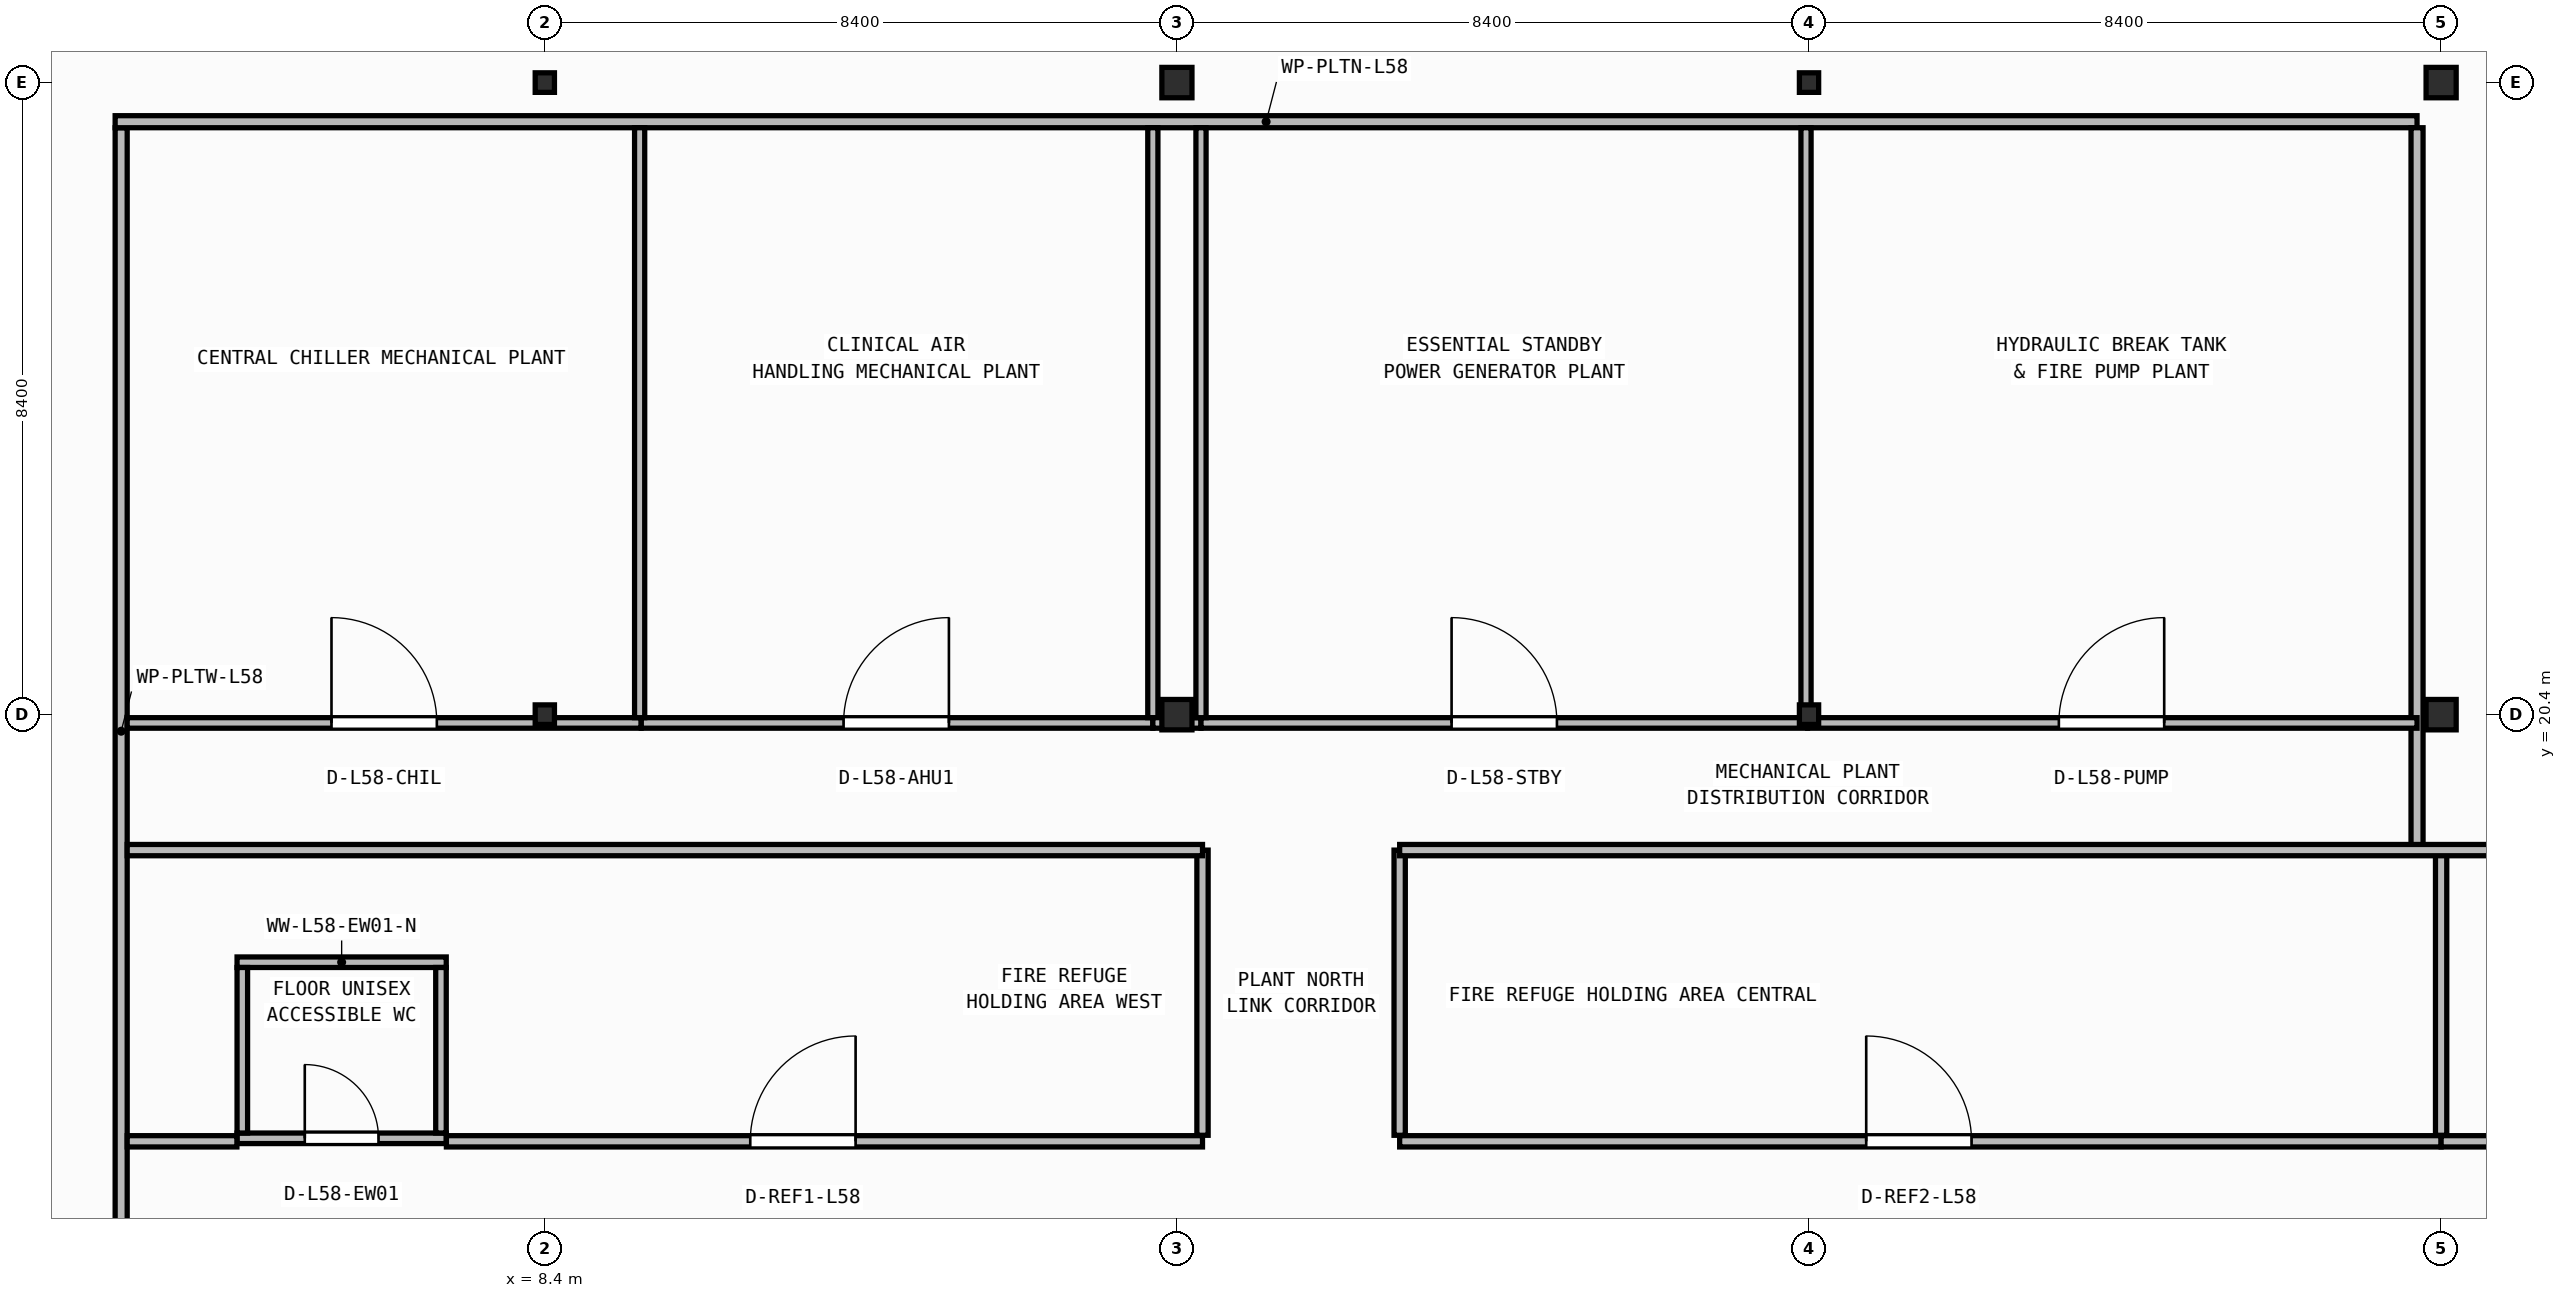
"""IFC4 building model, lengths in metres.
Left out: names, types, materials, properties, quantities, classifications, styles, units other than length and angle.
Written with IfcOpenShell. Run it as: python <this file> out.ifc"""

import sys

from ifc_helpers import new_model, si_unit, direction, frame, frame_2d, origin, origin_2d, place, context, subcontext, project, spatial, rectangle, i_section, extrude, element, fill, save


model = new_model("IFC4")
c1 = context("Model", 3, precision=1e-05, world=origin(), true_north=direction((0.0, 1.0)))
c2 = subcontext(c1, "Body", "Model", "MODEL_VIEW")
j1 = project(units=[si_unit("LENGTHUNIT", "METRE"), si_unit("PLANEANGLEUNIT", "RADIAN")], contexts=[c1])
p1 = place(None, origin())
s1 = spatial("IfcSite", under=j1, at=p1, CompositionType="ELEMENT")
p2 = place(p1, origin())
s2 = spatial("IfcBuilding", under=s1, at=p2, CompositionType="ELEMENT")
p3 = place(p2, frame((0.0, 0.0, 235.55)))
s3 = spatial("IfcBuildingStorey", under=s2, at=p3, CompositionType="ELEMENT", Elevation=235.55)
p4 = place(p3, frame((8.4, 20.4, 0.0), z_axis=(0.0, 0.0, 1.0), x_axis=(1.0, 0.0, 0.0)))
e1 = element("IfcColumn", 1, at=p4, inside=s3, PredefinedType="COLUMN", context=c2, shape_type="SweptSolid", body=[
    extrude(i_section(OverallWidth=0.256, OverallDepth=0.26, WebThickness=0.01, FlangeThickness=0.017, FilletRadius=0.013, at=origin_2d()), origin(), (0.0, 0.0, 1.0), 5.2),
])
p5 = place(p3, frame((16.8, 20.4, 0.0), z_axis=(0.0, 0.0, 1.0), x_axis=(1.0, 0.0, 0.0)))
e2 = element("IfcColumn", 2, at=p5, inside=s3, PredefinedType="COLUMN", context=c2, shape_type="SweptSolid", body=[
    extrude(i_section(OverallWidth=0.4, OverallDepth=0.404, WebThickness=0.02, FlangeThickness=0.032, at=origin_2d()), origin(), (0.0, 0.0, 1.0), 5.2),
])
p6 = place(p3, frame((25.2, 20.4, 0.0), z_axis=(0.0, 0.0, 1.0), x_axis=(1.0, 0.0, 0.0)))
e3 = element("IfcColumn", 3, at=p6, inside=s3, PredefinedType="COLUMN", context=c2, shape_type="SweptSolid", body=[
    extrude(i_section(OverallWidth=0.256, OverallDepth=0.26, WebThickness=0.01, FlangeThickness=0.017, FilletRadius=0.013, at=origin_2d()), origin(), (0.0, 0.0, 1.0), 5.2),
])
p7 = place(p3, frame((33.6, 20.4, 0.0), z_axis=(0.0, 0.0, 1.0), x_axis=(1.0, 0.0, 0.0)))
e4 = element("IfcColumn", 4, at=p7, inside=s3, PredefinedType="COLUMN", context=c2, shape_type="SweptSolid", body=[
    extrude(i_section(OverallWidth=0.4, OverallDepth=0.404, WebThickness=0.02, FlangeThickness=0.032, at=origin_2d()), origin(), (0.0, 0.0, 1.0), 5.2),
])
p8 = place(p3, frame((8.4, 28.8, 0.0), z_axis=(0.0, 0.0, 1.0), x_axis=(1.0, 0.0, 0.0)))
e5 = element("IfcColumn", 5, at=p8, inside=s3, PredefinedType="COLUMN", context=c2, shape_type="SweptSolid", body=[
    extrude(i_section(OverallWidth=0.256, OverallDepth=0.26, WebThickness=0.01, FlangeThickness=0.017, FilletRadius=0.013, at=origin_2d()), origin(), (0.0, 0.0, 1.0), 5.2),
])
p9 = place(p3, frame((16.8, 28.8, 0.0), z_axis=(0.0, 0.0, 1.0), x_axis=(1.0, 0.0, 0.0)))
e6 = element("IfcColumn", 6, at=p9, inside=s3, PredefinedType="COLUMN", context=c2, shape_type="SweptSolid", body=[
    extrude(i_section(OverallWidth=0.4, OverallDepth=0.404, WebThickness=0.02, FlangeThickness=0.032, at=origin_2d()), origin(), (0.0, 0.0, 1.0), 5.2),
])
p10 = place(p3, frame((25.2, 28.8, 0.0), z_axis=(0.0, 0.0, 1.0), x_axis=(1.0, 0.0, 0.0)))
e7 = element("IfcColumn", 7, at=p10, inside=s3, PredefinedType="COLUMN", context=c2, shape_type="SweptSolid", body=[
    extrude(i_section(OverallWidth=0.256, OverallDepth=0.26, WebThickness=0.01, FlangeThickness=0.017, FilletRadius=0.013, at=origin_2d()), origin(), (0.0, 0.0, 1.0), 5.2),
])
p11 = place(p3, frame((33.6, 28.8, 0.0), z_axis=(0.0, 0.0, 1.0), x_axis=(1.0, 0.0, 0.0)))
e8 = element("IfcColumn", 8, at=p11, inside=s3, PredefinedType="COLUMN", context=c2, shape_type="SweptSolid", body=[
    extrude(i_section(OverallWidth=0.4, OverallDepth=0.404, WebThickness=0.02, FlangeThickness=0.032, at=origin_2d()), origin(), (0.0, 0.0, 1.0), 5.2),
])
p12 = place(p3, frame((4.31, 14.77, 0.0), z_axis=(0.0, 0.0, 1.0), x_axis=(1.0, 0.0, 0.0)))
e9 = element("IfcWall", 9, at=p12, inside=s3, PredefinedType="PARTITIONING", context=c2, shape_type="SweptSolid", body=[
    extrude(rectangle(XDim=2.78, YDim=0.14, at=frame_2d((1.39, 0.0))), origin(), (0.0, 0.0, 1.0), 4.96),
])
p13 = place(p12, frame((0.9, 0.0, 0.0)))
e10 = element("IfcOpeningElement", 10, at=p13, cuts=e9, PredefinedType="OPENING", context=c2, shape_type="SweptSolid", body=[
    extrude(rectangle(XDim=0.98, YDim=2.1, at=frame_2d((0.49, 1.05))), frame((0.0, 0.08, 0.0), z_axis=(0.0, -1.0, 0.0), x_axis=(1.0, 0.0, 0.0)), (0.0, 0.0, 1.0), 0.16),
])
p14 = place(p3, frame((4.31, 17.11, 0.0), z_axis=(0.0, 0.0, 1.0), x_axis=(1.0, 0.0, 0.0)))
e11 = element("IfcWall", 11, at=p14, inside=s3, PredefinedType="PARTITIONING", context=c2, shape_type="SweptSolid", body=[
    extrude(rectangle(XDim=2.78, YDim=0.14, at=frame_2d((1.39, 0.0))), origin(), (0.0, 0.0, 1.0), 4.96),
])
for number, where, z_axis, x_axis in (
    (12, (4.38, 14.84, 0.0), (0.0, 0.0, 1.0), (0.0, 1.0, 0.0)),
    (13, (7.02, 14.84, 0.0), (0.0, 0.0, 1.0), (0.0, 1.0, 0.0)),
):
    element("IfcWall", number, at=place(p3, frame(where, z_axis=z_axis, x_axis=x_axis)), inside=s3, PredefinedType="PARTITIONING", context=c2, shape_type="SweptSolid", body=[
        extrude(rectangle(XDim=2.2, YDim=0.14, at=frame_2d((1.1, 0.0))), origin(), (0.0, 0.0, 1.0), 4.96),
    ])
p15 = place(p3, frame((2.77, 12.16, 0.0), z_axis=(0.0, 0.0, 1.0), x_axis=(0.0, 1.0, 0.0)))
e14 = element("IfcWall", 14, at=p15, inside=s3, PredefinedType="PARTITIONING", context=c2, shape_type="SweptSolid", body=[
    extrude(rectangle(XDim=16.04, YDim=0.16, at=frame_2d((8.02, 0.0))), origin(), (0.0, 0.0, 1.0), 4.96),
])
p16 = place(p3, frame((2.69, 28.28, 0.0), z_axis=(0.0, 0.0, 1.0), x_axis=(1.0, 0.0, 0.0)))
e15 = element("IfcWall", 15, at=p16, inside=s3, PredefinedType="PARTITIONING", context=c2, shape_type="SweptSolid", body=[
    extrude(rectangle(XDim=30.59, YDim=0.16, at=frame_2d((15.295, 0.0))), origin(), (0.0, 0.0, 1.0), 4.96),
])
p17 = place(p3, frame((33.28, 18.6, 0.0), z_axis=(0.0, 0.0, 1.0), x_axis=(0.0, 1.0, 0.0)))
e16 = element("IfcWall", 16, at=p17, inside=s3, PredefinedType="PARTITIONING", context=c2, shape_type="SweptSolid", body=[
    extrude(rectangle(XDim=9.6, YDim=0.16, at=frame_2d((4.8, 0.0))), origin(), (0.0, 0.0, 1.0), 4.407),
])
p18 = place(p3, frame((2.85, 14.73, 0.0), z_axis=(0.0, 0.0, 1.0), x_axis=(1.0, 0.0, 0.0)))
e17 = element("IfcWall", 17, at=p18, inside=s3, PredefinedType="PARTITIONING", context=c2, shape_type="SweptSolid", body=[
    extrude(rectangle(XDim=1.458, YDim=0.15, at=frame_2d((0.729, 0.0))), origin(), (0.0, 0.0, 1.0), 4.96),
])
p19 = place(p3, frame((7.092, 14.73, 0.0), z_axis=(0.0, 0.0, 1.0), x_axis=(1.0, 0.0, 0.0)))
e18 = element("IfcWall", 18, at=p19, inside=s3, PredefinedType="PARTITIONING", context=c2, shape_type="SweptSolid", body=[
    extrude(rectangle(XDim=10.048, YDim=0.15, at=frame_2d((5.024, 0.0))), origin(), (0.0, 0.0, 1.0), 4.96),
])
p20 = place(p19, frame((4.038, 0.0, 0.0)))
e19 = element("IfcOpeningElement", 19, at=p20, cuts=e18, PredefinedType="OPENING", context=c2, shape_type="SweptSolid", body=[
    extrude(rectangle(XDim=1.4, YDim=2.15, at=frame_2d((0.7, 1.075))), frame((0.0, 0.085, 0.0), z_axis=(0.0, -1.0, 0.0), x_axis=(1.0, 0.0, 0.0)), (0.0, 0.0, 1.0), 0.17),
])
p21 = place(p3, frame((17.14, 14.81, 0.0), z_axis=(0.0, 0.0, 1.0), x_axis=(0.0, 1.0, 0.0)))
e20 = element("IfcWall", 20, at=p21, inside=s3, PredefinedType="PARTITIONING", context=c2, shape_type="SweptSolid", body=[
    extrude(rectangle(XDim=3.79, YDim=0.15, at=frame_2d((1.895, 0.0))), origin(), (0.0, 0.0, 1.0), 4.96),
])
p22 = place(p3, frame((2.85, 18.6, 0.0), z_axis=(0.0, 0.0, 1.0), x_axis=(1.0, 0.0, 0.0)))
e21 = element("IfcWall", 21, at=p22, inside=s3, PredefinedType="PARTITIONING", context=c2, shape_type="SweptSolid", body=[
    extrude(rectangle(XDim=14.29, YDim=0.15, at=frame_2d((7.145, 0.0))), origin(), (0.0, 0.0, 1.0), 4.96),
])
p23 = place(p3, frame((19.76, 14.81, 0.0), z_axis=(0.0, 0.0, 1.0), x_axis=(0.0, 1.0, 0.0)))
e22 = element("IfcWall", 22, at=p23, inside=s3, PredefinedType="PARTITIONING", context=c2, shape_type="SweptSolid", body=[
    extrude(rectangle(XDim=3.79, YDim=0.15, at=frame_2d((1.895, 0.0))), origin(), (0.0, 0.0, 1.0), 4.96),
])
p24 = place(p3, frame((19.76, 14.73, 0.0), z_axis=(0.0, 0.0, 1.0), x_axis=(1.0, 0.0, 0.0)))
e23 = element("IfcWall", 23, at=p24, inside=s3, PredefinedType="PARTITIONING", context=c2, shape_type="SweptSolid", body=[
    extrude(rectangle(XDim=13.84, YDim=0.15, at=frame_2d((6.92, 0.0))), origin(), (0.0, 0.0, 1.0), 4.96),
])
p25 = place(p24, frame((6.2, 0.0, 0.0)))
e24 = element("IfcOpeningElement", 24, at=p25, cuts=e23, PredefinedType="OPENING", context=c2, shape_type="SweptSolid", body=[
    extrude(rectangle(XDim=1.4, YDim=2.15, at=frame_2d((0.7, 1.075))), frame((0.0, 0.085, 0.0), z_axis=(0.0, -1.0, 0.0), x_axis=(1.0, 0.0, 0.0)), (0.0, 0.0, 1.0), 0.17),
])
p26 = place(p3, frame((33.6, 14.81, 0.0), z_axis=(0.0, 0.0, 1.0), x_axis=(0.0, 1.0, 0.0)))
e25 = element("IfcWall", 25, at=p26, inside=s3, PredefinedType="PARTITIONING", context=c2, shape_type="SweptSolid", body=[
    extrude(rectangle(XDim=3.79, YDim=0.15, at=frame_2d((1.895, 0.0))), origin(), (0.0, 0.0, 1.0), 4.407),
])
p27 = place(p3, frame((33.6, 14.73, 0.0), z_axis=(0.0, 0.0, 1.0), x_axis=(1.0, 0.0, 0.0)))
e26 = element("IfcWall", 26, at=p27, inside=s3, PredefinedType="PARTITIONING", context=c2, shape_type="SweptSolid", body=[
    extrude(rectangle(XDim=9.6, YDim=0.15, at=frame_2d((4.8, 0.0))), origin(), (0.0, 0.0, 1.0), 4.96),
])
p28 = place(p27, frame((4.1, 0.0, 0.0)))
e27 = element("IfcOpeningElement", 27, at=p28, cuts=e26, PredefinedType="OPENING", context=c2, shape_type="SweptSolid", body=[
    extrude(rectangle(XDim=1.4, YDim=2.15, at=frame_2d((0.7, 1.075))), frame((0.0, 0.085, 0.0), z_axis=(0.0, -1.0, 0.0), x_axis=(1.0, 0.0, 0.0)), (0.0, 0.0, 1.0), 0.17),
])
p29 = place(p3, frame((19.76, 18.6, 0.0), z_axis=(0.0, 0.0, 1.0), x_axis=(1.0, 0.0, 0.0)))
e28 = element("IfcWall", 28, at=p29, inside=s3, PredefinedType="PARTITIONING", context=c2, shape_type="SweptSolid", body=[
    extrude(rectangle(XDim=23.44, YDim=0.15, at=frame_2d((11.72, 0.0))), origin(), (0.0, 0.0, 1.0), 4.96),
])
p30 = place(p3, frame((2.85, 20.29, 0.0), z_axis=(0.0, 0.0, 1.0), x_axis=(1.0, 0.0, 0.0)))
e29 = element("IfcWall", 29, at=p30, inside=s3, PredefinedType="PARTITIONING", context=c2, shape_type="SweptSolid", body=[
    extrude(rectangle(XDim=6.83, YDim=0.14, at=frame_2d((3.415, 0.0))), origin(), (0.0, 0.0, 1.0), 4.235),
])
p31 = place(p30, frame((2.715, 0.0, 0.0)))
e30 = element("IfcOpeningElement", 30, at=p31, cuts=e29, PredefinedType="OPENING", context=c2, shape_type="SweptSolid", body=[
    extrude(rectangle(XDim=1.4, YDim=2.15, at=frame_2d((0.7, 1.075))), frame((0.0, 0.08, 0.0), z_axis=(0.0, -1.0, 0.0), x_axis=(1.0, 0.0, 0.0)), (0.0, 0.0, 1.0), 0.16),
])
p32 = place(p3, frame((9.682, 20.29, 0.0), z_axis=(0.0, 0.0, 1.0), x_axis=(1.0, 0.0, 0.0)))
e31 = element("IfcWall", 31, at=p32, inside=s3, PredefinedType="PARTITIONING", context=c2, shape_type="SweptSolid", body=[
    extrude(rectangle(XDim=6.798, YDim=0.14, at=frame_2d((3.399, 0.0))), origin(), (0.0, 0.0, 1.0), 4.235),
])
p33 = place(p32, frame((2.688, 0.0, 0.0)))
e32 = element("IfcOpeningElement", 32, at=p33, cuts=e31, PredefinedType="OPENING", context=c2, shape_type="SweptSolid", body=[
    extrude(rectangle(XDim=1.4, YDim=2.15, at=frame_2d((0.7, 1.075))), frame((0.0, 0.08, 0.0), z_axis=(0.0, -1.0, 0.0), x_axis=(1.0, 0.0, 0.0)), (0.0, 0.0, 1.0), 0.16),
])
p34 = place(p3, frame((9.66, 20.36, 0.0), z_axis=(0.0, 0.0, 1.0), x_axis=(0.0, 1.0, 0.0)))
e33 = element("IfcWall", 33, at=p34, inside=s3, PredefinedType="PARTITIONING", context=c2, shape_type="SweptSolid", body=[
    extrude(rectangle(XDim=7.84, YDim=0.135, at=frame_2d((3.92, 0.0))), origin(), (0.0, 0.0, 1.0), 4.96),
])
p35 = place(p3, frame((16.48, 20.36, 0.0), z_axis=(0.0, 0.0, 1.0), x_axis=(0.0, 1.0, 0.0)))
e34 = element("IfcWall", 34, at=p35, inside=s3, PredefinedType="PARTITIONING", context=c2, shape_type="SweptSolid", body=[
    extrude(rectangle(XDim=7.84, YDim=0.135, at=frame_2d((3.92, 0.0))), origin(), (0.0, 0.0, 1.0), 4.407),
])
p36 = place(p3, frame((16.48, 20.29, 0.0), z_axis=(0.0, 0.0, 1.0), x_axis=(1.0, 0.0, 0.0)))
e35 = element("IfcWall", 35, at=p36, inside=s3, PredefinedType="PARTITIONING", context=c2, shape_type="SweptSolid", body=[
    extrude(rectangle(XDim=0.64, YDim=0.14, at=frame_2d((0.32, 0.0))), origin(), (0.0, 0.0, 1.0), 4.235),
])
p37 = place(p3, frame((17.12, 20.29, 0.0), z_axis=(0.0, 0.0, 1.0), x_axis=(1.0, 0.0, 0.0)))
e36 = element("IfcWall", 36, at=p37, inside=s3, PredefinedType="PARTITIONING", context=c2, shape_type="SweptSolid", body=[
    extrude(rectangle(XDim=8.06, YDim=0.14, at=frame_2d((4.03, 0.0))), origin(), (0.0, 0.0, 1.0), 4.235),
])
p38 = place(p37, frame((3.33, 0.0, 0.0)))
e37 = element("IfcOpeningElement", 37, at=p38, cuts=e36, PredefinedType="OPENING", context=c2, shape_type="SweptSolid", body=[
    extrude(rectangle(XDim=1.4, YDim=2.15, at=frame_2d((0.7, 1.075))), frame((0.0, 0.08, 0.0), z_axis=(0.0, -1.0, 0.0), x_axis=(1.0, 0.0, 0.0)), (0.0, 0.0, 1.0), 0.16),
])
p39 = place(p3, frame((17.12, 20.36, 0.0), z_axis=(0.0, 0.0, 1.0), x_axis=(0.0, 1.0, 0.0)))
e38 = element("IfcWall", 38, at=p39, inside=s3, PredefinedType="PARTITIONING", context=c2, shape_type="SweptSolid", body=[
    extrude(rectangle(XDim=7.84, YDim=0.135, at=frame_2d((3.92, 0.0))), origin(), (0.0, 0.0, 1.0), 4.407),
])
p40 = place(p3, frame((25.182, 20.29, 0.0), z_axis=(0.0, 0.0, 1.0), x_axis=(1.0, 0.0, 0.0)))
e39 = element("IfcWall", 39, at=p40, inside=s3, PredefinedType="PARTITIONING", context=c2, shape_type="SweptSolid", body=[
    extrude(rectangle(XDim=8.098, YDim=0.14, at=frame_2d((4.049, 0.0))), origin(), (0.0, 0.0, 1.0), 4.235),
])
p41 = place(p40, frame((3.338, 0.0, 0.0)))
e40 = element("IfcOpeningElement", 40, at=p41, cuts=e39, PredefinedType="OPENING", context=c2, shape_type="SweptSolid", body=[
    extrude(rectangle(XDim=1.4, YDim=2.15, at=frame_2d((0.7, 1.075))), frame((0.0, 0.08, 0.0), z_axis=(0.0, -1.0, 0.0), x_axis=(1.0, 0.0, 0.0)), (0.0, 0.0, 1.0), 0.16),
])
p42 = place(p3, frame((25.16, 20.36, 0.0), z_axis=(0.0, 0.0, 1.0), x_axis=(0.0, 1.0, 0.0)))
e41 = element("IfcWall", 41, at=p42, inside=s3, PredefinedType="PARTITIONING", context=c2, shape_type="SweptSolid", body=[
    extrude(rectangle(XDim=7.84, YDim=0.135, at=frame_2d((3.92, 0.0))), origin(), (0.0, 0.0, 1.0), 4.407),
])
p43 = place(p13, origin())
e42 = element("IfcDoor", 42, at=p43, inside=s3, OperationType="SINGLE_SWING_LEFT", PredefinedType="DOOR", context=c2, shape_type="SweptSolid", body=[
    extrude(rectangle(XDim=0.98, YDim=2.1, at=frame_2d((0.49, 1.05))), frame((0.0, 0.025, 0.0), z_axis=(0.0, -1.0, 0.0), x_axis=(1.0, 0.0, 0.0)), (0.0, 0.0, 1.0), 0.05),
])
fill(e10, e42)
p44 = place(p20, origin())
e43 = element("IfcDoor", 43, at=p44, inside=s3, OperationType="SINGLE_SWING_RIGHT", PredefinedType="DOOR", context=c2, shape_type="SweptSolid", body=[
    extrude(rectangle(XDim=1.4, YDim=2.15, at=frame_2d((0.7, 1.075))), frame((0.0, 0.025, 0.0), z_axis=(0.0, -1.0, 0.0), x_axis=(1.0, 0.0, 0.0)), (0.0, 0.0, 1.0), 0.05),
])
fill(e19, e43)
p45 = place(p25, origin())
e44 = element("IfcDoor", 44, at=p45, inside=s3, OperationType="SINGLE_SWING_LEFT", PredefinedType="DOOR", context=c2, shape_type="SweptSolid", body=[
    extrude(rectangle(XDim=1.4, YDim=2.15, at=frame_2d((0.7, 1.075))), frame((0.0, 0.025, 0.0), z_axis=(0.0, -1.0, 0.0), x_axis=(1.0, 0.0, 0.0)), (0.0, 0.0, 1.0), 0.05),
])
fill(e24, e44)
p46 = place(p31, origin())
e45 = element("IfcDoor", 45, at=p46, inside=s3, OperationType="SINGLE_SWING_LEFT", PredefinedType="DOOR", context=c2, shape_type="SweptSolid", body=[
    extrude(rectangle(XDim=1.4, YDim=2.15, at=frame_2d((0.7, 1.075))), frame((0.0, 0.025, 0.0), z_axis=(0.0, -1.0, 0.0), x_axis=(1.0, 0.0, 0.0)), (0.0, 0.0, 1.0), 0.05),
])
fill(e30, e45)
p47 = place(p33, origin())
e46 = element("IfcDoor", 46, at=p47, inside=s3, OperationType="SINGLE_SWING_RIGHT", PredefinedType="DOOR", context=c2, shape_type="SweptSolid", body=[
    extrude(rectangle(XDim=1.4, YDim=2.15, at=frame_2d((0.7, 1.075))), frame((0.0, 0.025, 0.0), z_axis=(0.0, -1.0, 0.0), x_axis=(1.0, 0.0, 0.0)), (0.0, 0.0, 1.0), 0.05),
])
fill(e32, e46)
p48 = place(p38, origin())
e47 = element("IfcDoor", 47, at=p48, inside=s3, OperationType="SINGLE_SWING_LEFT", PredefinedType="DOOR", context=c2, shape_type="SweptSolid", body=[
    extrude(rectangle(XDim=1.4, YDim=2.15, at=frame_2d((0.7, 1.075))), frame((0.0, 0.025, 0.0), z_axis=(0.0, -1.0, 0.0), x_axis=(1.0, 0.0, 0.0)), (0.0, 0.0, 1.0), 0.05),
])
fill(e37, e47)
p49 = place(p41, origin())
e48 = element("IfcDoor", 48, at=p49, inside=s3, OperationType="SINGLE_SWING_RIGHT", PredefinedType="DOOR", context=c2, shape_type="SweptSolid", body=[
    extrude(rectangle(XDim=1.4, YDim=2.15, at=frame_2d((0.7, 1.075))), frame((0.0, 0.025, 0.0), z_axis=(0.0, -1.0, 0.0), x_axis=(1.0, 0.0, 0.0)), (0.0, 0.0, 1.0), 0.05),
])
fill(e40, e48)
save(model, sys.argv[1])
